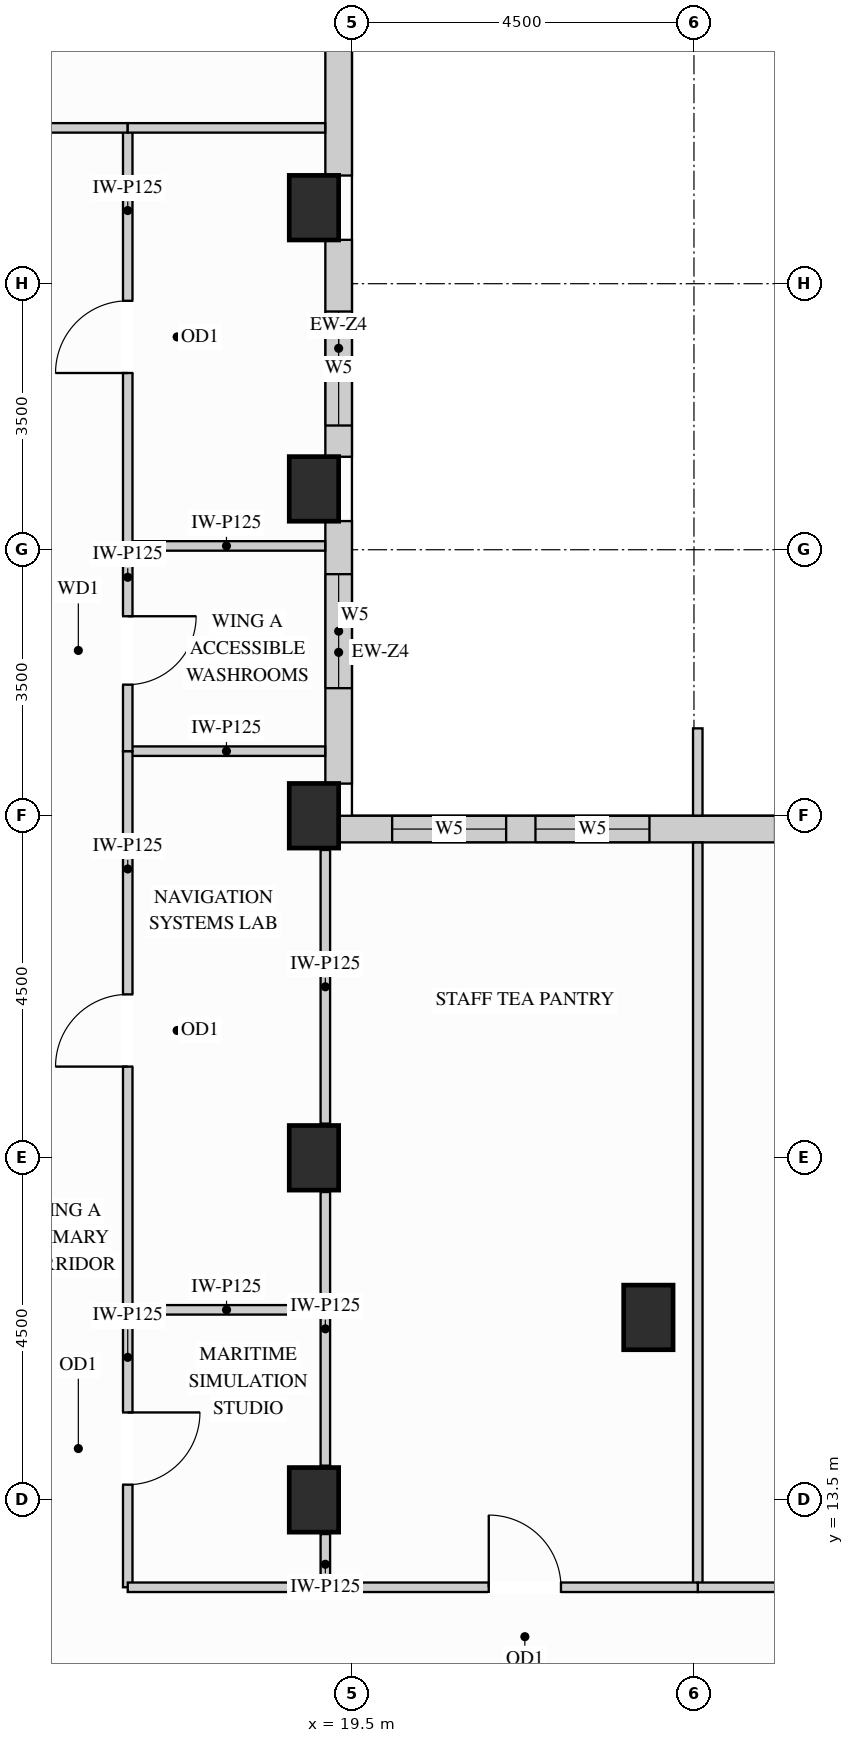
"""IFC4 building model, lengths in metres.
Left out: names, types, materials, properties, quantities, classifications, styles, units other than length and angle.
Written with IfcOpenShell. Run it as: python <this file> out.ifc"""

import sys

from ifc_helpers import new_model, si_unit, direction, frame, frame_2d, origin, origin_2d, place, context, subcontext, project, spatial, rectangle, extrude, source, transform, mapped, element, fill, save


model = new_model("IFC4")
c1 = context("Model", 3, precision=1e-05, world=origin(), true_north=direction((0.0, 1.0)))
c2 = subcontext(c1, "Body", "Model", "MODEL_VIEW")
j1 = project(units=[si_unit("LENGTHUNIT", "METRE"), si_unit("PLANEANGLEUNIT", "RADIAN")], contexts=[c1])
p1 = place(None, origin())
s1 = spatial("IfcSite", under=j1, at=p1, CompositionType="ELEMENT")
p2 = place(p1, origin())
s2 = spatial("IfcBuilding", under=s1, at=p2, CompositionType="ELEMENT")
p3 = place(p2, frame((0.0, 0.0, 255.6)))
s3 = spatial("IfcBuildingStorey", under=s2, at=p3, CompositionType="ELEMENT", Elevation=255.6)
m1 = source(origin(), c2, "Body", "SweptSolid", [
    extrude(rectangle(XDim=0.65, YDim=0.85, at=origin_2d()), origin(), (0.0, 0.0, 1.0), 3.4),
])
for number, where, z_axis, x_axis in (
    (1, (19.0, 13.5, 0.0), (0.0, 0.0, 1.0), (1.0, 0.0, 0.0)),
    (2, (19.0, 18.0, 0.0), (0.0, 0.0, 1.0), (1.0, 0.0, 0.0)),
    (3, (19.0, 22.5, 0.0), (0.0, 0.0, 1.0), (1.0, 0.0, 0.0)),
    (4, (19.0, 26.8, 0.0), (0.0, 0.0, 1.0), (1.0, 0.0, 0.0)),
    (5, (19.0, 30.5, 0.0), (0.0, 0.0, 1.0), (1.0, 0.0, 0.0)),
    (6, (23.4, 15.9, 0.0), (0.0, 0.0, 1.0), (1.0, 0.0, 0.0)),
):
    element("IfcColumn", number, at=place(p3, frame(where, z_axis=z_axis, x_axis=x_axis)), inside=s3, PredefinedType="COLUMN", context=c2, shape_type="MappedRepresentation", body=[
        mapped(m1, transform((0.0, 0.0, 0.0), x_axis=(1.0, 0.0, 0.0), y_axis=(0.0, 1.0, 0.0), z_axis=(0.0, 0.0, 1.0))),
    ])
p4 = place(p3, frame((34.4, 22.325, 0.0), z_axis=(0.0, 0.0, 1.0), x_axis=(-1.0, 0.0, 0.0)))
e7 = element("IfcWall", 7, at=p4, inside=s3, PredefinedType="SOLIDWALL", context=c2, shape_type="SweptSolid", body=[
    extrude(rectangle(XDim=15.077, YDim=0.35, at=frame_2d((7.539, 0.0))), origin(), (0.0, 0.0, 1.0), 3.385),
])
p5 = place(p4, frame((0.647, 0.0, 0.78)))
e8 = element("IfcOpeningElement", 8, at=p5, cuts=e7, PredefinedType="OPENING", context=c2, shape_type="SweptSolid", body=[
    extrude(rectangle(XDim=1.5, YDim=2.0, at=frame_2d((0.75, 1.0))), frame((0.0, 0.185, 0.0), z_axis=(0.0, -1.0, 0.0), x_axis=(1.0, 0.0, 0.0)), (0.0, 0.0, 1.0), 0.37),
])
p6 = place(p4, frame((2.473, 0.0, 0.78)))
e9 = element("IfcOpeningElement", 9, at=p6, cuts=e7, PredefinedType="OPENING", context=c2, shape_type="SweptSolid", body=[
    extrude(rectangle(XDim=1.5, YDim=2.0, at=frame_2d((0.75, 1.0))), frame((0.0, 0.185, 0.0), z_axis=(0.0, -1.0, 0.0), x_axis=(1.0, 0.0, 0.0)), (0.0, 0.0, 1.0), 0.37),
])
p7 = place(p4, frame((5.567, 0.0, 0.78)))
e10 = element("IfcOpeningElement", 10, at=p7, cuts=e7, PredefinedType="OPENING", context=c2, shape_type="SweptSolid", body=[
    extrude(rectangle(XDim=1.5, YDim=2.0, at=frame_2d((0.75, 1.0))), frame((0.0, 0.185, 0.0), z_axis=(0.0, -1.0, 0.0), x_axis=(1.0, 0.0, 0.0)), (0.0, 0.0, 1.0), 0.37),
])
p8 = place(p4, frame((7.833, 0.0, 0.78)))
e11 = element("IfcOpeningElement", 11, at=p8, cuts=e7, PredefinedType="OPENING", context=c2, shape_type="SweptSolid", body=[
    extrude(rectangle(XDim=1.5, YDim=2.0, at=frame_2d((0.75, 1.0))), frame((0.0, 0.185, 0.0), z_axis=(0.0, -1.0, 0.0), x_axis=(1.0, 0.0, 0.0)), (0.0, 0.0, 1.0), 0.37),
])
p9 = place(p4, frame((10.986, 0.0, 0.78)))
e12 = element("IfcOpeningElement", 12, at=p9, cuts=e7, PredefinedType="OPENING", context=c2, shape_type="SweptSolid", body=[
    extrude(rectangle(XDim=1.5, YDim=2.0, at=frame_2d((0.75, 1.0))), frame((0.0, 0.185, 0.0), z_axis=(0.0, -1.0, 0.0), x_axis=(1.0, 0.0, 0.0)), (0.0, 0.0, 1.0), 0.37),
])
p10 = place(p4, frame((12.871, 0.0, 0.78)))
e13 = element("IfcOpeningElement", 13, at=p10, cuts=e7, PredefinedType="OPENING", context=c2, shape_type="SweptSolid", body=[
    extrude(rectangle(XDim=1.5, YDim=2.0, at=frame_2d((0.75, 1.0))), frame((0.0, 0.185, 0.0), z_axis=(0.0, -1.0, 0.0), x_axis=(1.0, 0.0, 0.0)), (0.0, 0.0, 1.0), 0.37),
])
p11 = place(p3, frame((19.325, 22.923, 0.0), z_axis=(0.0, 0.0, 1.0), x_axis=(0.0, 1.0, 0.0)))
e14 = element("IfcWall", 14, at=p11, inside=s3, PredefinedType="SOLIDWALL", context=c2, shape_type="SweptSolid", body=[
    extrude(rectangle(XDim=3.454, YDim=0.35, at=frame_2d((1.727, 0.0))), origin(), (0.0, 0.0, 1.0), 2.619),
])
p12 = place(p11, frame((1.256, 0.0, 0.78)))
e15 = element("IfcOpeningElement", 15, at=p12, cuts=e14, PredefinedType="OPENING", context=c2, shape_type="SweptSolid", body=[
    extrude(rectangle(XDim=1.5, YDim=1.659, at=frame_2d((0.75, 0.83))), frame((0.0, 0.185, 0.0), z_axis=(0.0, -1.0, 0.0), x_axis=(1.0, 0.0, 0.0)), (0.0, 0.0, 1.0), 0.37),
])
p13 = place(p3, frame((19.325, 27.223, 0.0), z_axis=(0.0, 0.0, 1.0), x_axis=(0.0, 1.0, 0.0)))
e16 = element("IfcWall", 16, at=p13, inside=s3, PredefinedType="SOLIDWALL", context=c2, shape_type="SweptSolid", body=[
    extrude(rectangle(XDim=2.854, YDim=0.35, at=frame_2d((1.427, 0.0))), origin(), (0.0, 0.0, 1.0), 2.619),
])
p14 = place(p13, frame((0.411, 0.0, 0.78)))
e17 = element("IfcOpeningElement", 17, at=p14, cuts=e16, PredefinedType="OPENING", context=c2, shape_type="SweptSolid", body=[
    extrude(rectangle(XDim=1.5, YDim=1.659, at=frame_2d((0.75, 0.83))), frame((0.0, 0.185, 0.0), z_axis=(0.0, -1.0, 0.0), x_axis=(1.0, 0.0, 0.0)), (0.0, 0.0, 1.0), 0.37),
])
m2 = source(origin(), c2, "Body", "SweptSolid", [
    extrude(rectangle(XDim=3.654, YDim=0.35, at=frame_2d((1.827, 0.0))), origin(), (0.0, 0.0, 1.0), 2.619),
])
p15 = place(p3, frame((19.325, 30.923, 0.0), z_axis=(0.0, 0.0, 1.0), x_axis=(0.0, 1.0, 0.0)))
e18 = element("IfcWall", 18, at=p15, inside=s3, PredefinedType="SOLIDWALL", context=c2, shape_type="MappedRepresentation", body=[
    mapped(m2, transform((0.0, 0.0, 0.0), x_axis=(1.0, 0.0, 0.0), y_axis=(0.0, 1.0, 0.0), z_axis=(0.0, 0.0, 1.0))),
])
m3 = source(origin(), c2, "Body", "SweptSolid", [
    extrude(rectangle(XDim=2.6, YDim=0.125, at=frame_2d((1.3, 0.0))), origin(), (0.0, 0.0, 1.0), 3.385),
])
p16 = place(p3, frame((16.55, 16.0, 0.0), z_axis=(0.0, 0.0, 1.0), x_axis=(1.0, 0.0, 0.0)))
e19 = element("IfcWall", 19, at=p16, inside=s3, PredefinedType="PARTITIONING", context=c2, shape_type="MappedRepresentation", body=[
    mapped(m3, transform((0.0, 0.0, 0.0), x_axis=(1.0, 0.0, 0.0), y_axis=(0.0, 1.0, 0.0), z_axis=(0.0, 0.0, 1.0))),
])
m4 = source(origin(), c2, "Body", "SweptSolid", [
    extrude(rectangle(XDim=2.598, YDim=0.125, at=frame_2d((1.299, 0.0))), origin(), (0.0, 0.0, 1.0), 3.385),
])
for number, where, z_axis, x_axis in (
    (20, (16.55, 23.35, 0.0), (0.0, 0.0, 1.0), (1.0, 0.0, 0.0)),
    (21, (16.55, 26.05, 0.0), (0.0, 0.0, 1.0), (1.0, 0.0, 0.0)),
):
    element("IfcWall", number, at=place(p3, frame(where, z_axis=z_axis, x_axis=x_axis)), inside=s3, PredefinedType="PARTITIONING", context=c2, shape_type="MappedRepresentation", body=[
        mapped(m4, transform((0.0, 0.0, 0.0), x_axis=(1.0, 0.0, 0.0), y_axis=(0.0, 1.0, 0.0), z_axis=(0.0, 0.0, 1.0))),
    ])
m5 = source(origin(), c2, "Body", "SweptSolid", [
    extrude(rectangle(XDim=0.7, YDim=0.125, at=frame_2d((0.35, 0.0))), origin(), (0.0, 0.0, 1.0), 2.773),
])
p17 = place(p3, frame((19.15, 12.35, 0.0), z_axis=(0.0, 0.0, 1.0), x_axis=(0.0, 1.0, 0.0)))
e22 = element("IfcWall", 22, at=p17, inside=s3, PredefinedType="PARTITIONING", context=c2, shape_type="MappedRepresentation", body=[
    mapped(m5, transform((0.0, 0.0, 0.0), x_axis=(1.0, 0.0, 0.0), y_axis=(0.0, 1.0, 0.0), z_axis=(0.0, 0.0, 1.0))),
])
m6 = source(origin(), c2, "Body", "SweptSolid", [
    extrude(rectangle(XDim=3.6, YDim=0.125, at=frame_2d((1.8, 0.0))), origin(), (0.0, 0.0, 1.0), 2.773),
])
for number, where, z_axis, x_axis in (
    (23, (19.15, 13.95, 0.0), (0.0, 0.0, 1.0), (0.0, 1.0, 0.0)),
    (24, (19.15, 18.45, 0.0), (0.0, 0.0, 1.0), (0.0, 1.0, 0.0)),
):
    element("IfcWall", number, at=place(p3, frame(where, z_axis=z_axis, x_axis=x_axis)), inside=s3, PredefinedType="PARTITIONING", context=c2, shape_type="MappedRepresentation", body=[
        mapped(m6, transform((0.0, 0.0, 0.0), x_axis=(1.0, 0.0, 0.0), y_axis=(0.0, 1.0, 0.0), z_axis=(0.0, 0.0, 1.0))),
    ])
p18 = place(p3, frame((16.55, 12.35, 0.0), z_axis=(0.0, 0.0, 1.0), x_axis=(0.0, 1.0, 0.0)))
e25 = element("IfcWall", 25, at=p18, inside=s3, PredefinedType="PARTITIONING", context=c2, shape_type="SweptSolid", body=[
    extrude(rectangle(XDim=3.65, YDim=0.125, at=frame_2d((1.825, 0.0))), origin(), (0.0, 0.0, 1.0), 3.385),
])
p19 = place(p18, frame((1.35, 0.0, 0.0)))
e26 = element("IfcOpeningElement", 26, at=p19, cuts=e25, PredefinedType="OPENING", context=c2, shape_type="SweptSolid", body=[
    extrude(rectangle(XDim=0.95, YDim=2.15, at=frame_2d((0.475, 1.075))), frame((0.0, 0.073, 0.0), z_axis=(0.0, -1.0, 0.0), x_axis=(1.0, 0.0, 0.0)), (0.0, 0.0, 1.0), 0.145),
])
p20 = place(p3, frame((16.55, 16.0, 0.0), z_axis=(0.0, 0.0, 1.0), x_axis=(0.0, 1.0, 0.0)))
e27 = element("IfcWall", 27, at=p20, inside=s3, PredefinedType="PARTITIONING", context=c2, shape_type="SweptSolid", body=[
    extrude(rectangle(XDim=7.35, YDim=0.125, at=frame_2d((3.675, 0.0))), origin(), (0.0, 0.0, 1.0), 3.385),
])
p21 = place(p20, frame((3.2, 0.0, 0.0)))
e28 = element("IfcOpeningElement", 28, at=p21, cuts=e27, PredefinedType="OPENING", context=c2, shape_type="SweptSolid", body=[
    extrude(rectangle(XDim=0.95, YDim=2.15, at=frame_2d((0.475, 1.075))), frame((0.0, 0.073, 0.0), z_axis=(0.0, -1.0, 0.0), x_axis=(1.0, 0.0, 0.0)), (0.0, 0.0, 1.0), 0.145),
])
p22 = place(p3, frame((16.55, 26.05, 0.0), z_axis=(0.0, 0.0, 1.0), x_axis=(0.0, 1.0, 0.0)))
e29 = element("IfcWall", 29, at=p22, inside=s3, PredefinedType="PARTITIONING", context=c2, shape_type="SweptSolid", body=[
    extrude(rectangle(XDim=5.5, YDim=0.125, at=frame_2d((2.75, 0.0))), origin(), (0.0, 0.0, 1.0), 3.385),
])
p23 = place(p22, frame((2.275, 0.0, 0.0)))
e30 = element("IfcOpeningElement", 30, at=p23, cuts=e29, PredefinedType="OPENING", context=c2, shape_type="SweptSolid", body=[
    extrude(rectangle(XDim=0.95, YDim=2.15, at=frame_2d((0.475, 1.075))), frame((0.0, 0.073, 0.0), z_axis=(0.0, -1.0, 0.0), x_axis=(1.0, 0.0, 0.0)), (0.0, 0.0, 1.0), 0.145),
])
p24 = place(p3, frame((16.55, 23.35, 0.0), z_axis=(0.0, 0.0, 1.0), x_axis=(0.0, 1.0, 0.0)))
e31 = element("IfcWall", 31, at=p24, inside=s3, PredefinedType="PARTITIONING", context=c2, shape_type="SweptSolid", body=[
    extrude(rectangle(XDim=2.7, YDim=0.125, at=frame_2d((1.35, 0.0))), origin(), (0.0, 0.0, 1.0), 3.385),
])
p25 = place(p24, frame((0.875, 0.0, 0.0)))
e32 = element("IfcOpeningElement", 32, at=p25, cuts=e31, PredefinedType="OPENING", context=c2, shape_type="SweptSolid", body=[
    extrude(rectangle(XDim=0.9, YDim=2.15, at=frame_2d((0.45, 1.075))), frame((0.0, 0.073, 0.0), z_axis=(0.0, -1.0, 0.0), x_axis=(1.0, 0.0, 0.0)), (0.0, 0.0, 1.0), 0.145),
])
p26 = place(p3, frame((2.45, 31.55, 0.0), z_axis=(0.0, 0.0, 1.0), x_axis=(1.0, 0.0, 0.0)))
e33 = element("IfcWall", 33, at=p26, inside=s3, PredefinedType="PARTITIONING", context=c2, shape_type="SweptSolid", body=[
    extrude(rectangle(XDim=14.1, YDim=0.125, at=frame_2d((7.05, 0.0))), origin(), (0.0, 0.0, 1.0), 3.385),
])
p27 = place(p26, frame((6.575, 0.0, 0.0)))
e34 = element("IfcOpeningElement", 34, at=p27, cuts=e33, PredefinedType="OPENING", context=c2, shape_type="SweptSolid", body=[
    extrude(rectangle(XDim=0.95, YDim=2.15, at=frame_2d((0.475, 1.075))), frame((0.0, 0.073, 0.0), z_axis=(0.0, -1.0, 0.0), x_axis=(1.0, 0.0, 0.0)), (0.0, 0.0, 1.0), 0.145),
])
p28 = place(p3, frame((16.55, 31.55, 0.0), z_axis=(0.0, 0.0, 1.0), x_axis=(1.0, 0.0, 0.0)))
e35 = element("IfcWall", 35, at=p28, inside=s3, PredefinedType="PARTITIONING", context=c2, shape_type="MappedRepresentation", body=[
    mapped(m4, transform((0.0, 0.0, 0.0), x_axis=(1.0, 0.0, 0.0), y_axis=(0.0, 1.0, 0.0), z_axis=(0.0, 0.0, 1.0))),
])
m7 = source(origin(), c2, "Body", "SweptSolid", [
    extrude(rectangle(XDim=9.798, YDim=0.125, at=frame_2d((4.899, 0.0))), origin(), (0.0, 0.0, 1.0), 3.385),
])
p29 = place(p3, frame((24.05, 12.35, 0.0), z_axis=(0.0, 0.0, 1.0), x_axis=(0.0, 1.0, 0.0)))
e36 = element("IfcWall", 36, at=p29, inside=s3, PredefinedType="PARTITIONING", context=c2, shape_type="MappedRepresentation", body=[
    mapped(m7, transform((0.0, 0.0, 0.0), x_axis=(1.0, 0.0, 0.0), y_axis=(0.0, 1.0, 0.0), z_axis=(0.0, 0.0, 1.0))),
])
m8 = source(origin(), c2, "Body", "SweptSolid", [
    extrude(rectangle(XDim=1.148, YDim=0.125, at=frame_2d((0.574, 0.0))), origin(), (0.0, 0.0, 1.0), 3.385),
])
p30 = place(p3, frame((24.05, 22.502, 0.0), z_axis=(0.0, 0.0, 1.0), x_axis=(0.0, 1.0, 0.0)))
e37 = element("IfcWall", 37, at=p30, inside=s3, PredefinedType="PARTITIONING", context=c2, shape_type="MappedRepresentation", body=[
    mapped(m8, transform((0.0, 0.0, 0.0), x_axis=(1.0, 0.0, 0.0), y_axis=(0.0, 1.0, 0.0), z_axis=(0.0, 0.0, 1.0))),
])
p31 = place(p3, frame((24.05, 12.35, 0.0), z_axis=(0.0, 0.0, 1.0), x_axis=(1.0, 0.0, 0.0)))
e38 = element("IfcWall", 38, at=p31, inside=s3, PredefinedType="PARTITIONING", context=c2, shape_type="SweptSolid", body=[
    extrude(rectangle(XDim=5.8, YDim=0.125, at=frame_2d((2.9, 0.0))), origin(), (0.0, 0.0, 1.0), 3.385),
])
p32 = place(p31, frame((2.425, 0.0, 0.0)))
e39 = element("IfcOpeningElement", 39, at=p32, cuts=e38, PredefinedType="OPENING", context=c2, shape_type="SweptSolid", body=[
    extrude(rectangle(XDim=0.95, YDim=2.15, at=frame_2d((0.475, 1.075))), frame((0.0, 0.073, 0.0), z_axis=(0.0, -1.0, 0.0), x_axis=(1.0, 0.0, 0.0)), (0.0, 0.0, 1.0), 0.145),
])
m9 = source(origin(), c2, "Body", "SweptSolid", [
    extrude(rectangle(XDim=2.95, YDim=0.125, at=frame_2d((1.475, 0.0))), origin(), (0.0, 0.0, 1.0), 3.385),
])
p33 = place(p3, frame((16.55, 12.35, 0.0), z_axis=(0.0, 0.0, 1.0), x_axis=(1.0, 0.0, 0.0)))
e40 = element("IfcWall", 40, at=p33, inside=s3, PredefinedType="PARTITIONING", context=c2, shape_type="MappedRepresentation", body=[
    mapped(m9, transform((0.0, 0.0, 0.0), x_axis=(1.0, 0.0, 0.0), y_axis=(0.0, 1.0, 0.0), z_axis=(0.0, 0.0, 1.0))),
])
p34 = place(p3, frame((19.5, 12.35, 0.0), z_axis=(0.0, 0.0, 1.0), x_axis=(1.0, 0.0, 0.0)))
e41 = element("IfcWall", 41, at=p34, inside=s3, PredefinedType="PARTITIONING", context=c2, shape_type="SweptSolid", body=[
    extrude(rectangle(XDim=4.55, YDim=0.125, at=frame_2d((2.275, 0.0))), origin(), (0.0, 0.0, 1.0), 3.385),
])
p35 = place(p34, frame((1.8, 0.0, 0.0)))
e42 = element("IfcOpeningElement", 42, at=p35, cuts=e41, PredefinedType="OPENING", context=c2, shape_type="SweptSolid", body=[
    extrude(rectangle(XDim=0.95, YDim=2.15, at=frame_2d((0.475, 1.075))), frame((0.0, 0.073, 0.0), z_axis=(0.0, -1.0, 0.0), x_axis=(1.0, 0.0, 0.0)), (0.0, 0.0, 1.0), 0.145),
])
m10 = source(origin(), c2, "Body", "SweptSolid", [
    extrude(rectangle(XDim=0.95, YDim=2.15, at=frame_2d((0.475, 1.075))), frame((0.0, 0.025, 0.0), z_axis=(0.0, -1.0, 0.0), x_axis=(1.0, 0.0, 0.0)), (0.0, 0.0, 1.0), 0.05),
])
p36 = place(p19, origin())
e43 = element("IfcDoor", 43, at=p36, inside=s3, OperationType="SINGLE_SWING_RIGHT", PredefinedType="DOOR", context=c2, shape_type="MappedRepresentation", body=[
    mapped(m10, transform((0.0, 0.0, 0.0), x_axis=(1.0, 0.0, 0.0), y_axis=(0.0, 1.0, 0.0), z_axis=(0.0, 0.0, 1.0))),
])
fill(e26, e43)
p37 = place(p21, origin())
e44 = element("IfcDoor", 44, at=p37, inside=s3, OperationType="SINGLE_SWING_LEFT", PredefinedType="DOOR", context=c2, shape_type="MappedRepresentation", body=[
    mapped(m10, transform((0.0, 0.0, 0.0), x_axis=(1.0, 0.0, 0.0), y_axis=(0.0, 1.0, 0.0), z_axis=(0.0, 0.0, 1.0))),
])
fill(e28, e44)
p38 = place(p23, origin())
e45 = element("IfcDoor", 45, at=p38, inside=s3, OperationType="SINGLE_SWING_LEFT", PredefinedType="DOOR", context=c2, shape_type="MappedRepresentation", body=[
    mapped(m10, transform((0.0, 0.0, 0.0), x_axis=(1.0, 0.0, 0.0), y_axis=(0.0, 1.0, 0.0), z_axis=(0.0, 0.0, 1.0))),
])
fill(e30, e45)
p39 = place(p35, origin())
e46 = element("IfcDoor", 46, at=p39, inside=s3, OperationType="SINGLE_SWING_LEFT", PredefinedType="DOOR", context=c2, shape_type="MappedRepresentation", body=[
    mapped(m10, transform((0.0, 0.0, 0.0), x_axis=(1.0, 0.0, 0.0), y_axis=(0.0, 1.0, 0.0), z_axis=(0.0, 0.0, 1.0))),
])
fill(e42, e46)
m11 = source(origin(), c2, "Body", "SweptSolid", [
    extrude(rectangle(XDim=0.9, YDim=2.15, at=frame_2d((0.45, 1.075))), frame((0.0, 0.025, 0.0), z_axis=(0.0, -1.0, 0.0), x_axis=(1.0, 0.0, 0.0)), (0.0, 0.0, 1.0), 0.05),
])
p40 = place(p25, origin())
e47 = element("IfcDoor", 47, at=p40, inside=s3, OperationType="SINGLE_SWING_RIGHT", PredefinedType="DOOR", context=c2, shape_type="MappedRepresentation", body=[
    mapped(m11, transform((0.0, 0.0, 0.0), x_axis=(1.0, 0.0, 0.0), y_axis=(0.0, 1.0, 0.0), z_axis=(0.0, 0.0, 1.0))),
])
fill(e32, e47)
m12 = source(origin(), c2, "Body", "SweptSolid", [
    extrude(rectangle(XDim=1.5, YDim=2.0, at=frame_2d((0.75, 1.0))), frame((0.0, 0.03, 0.0), z_axis=(0.0, -1.0, 0.0), x_axis=(1.0, 0.0, 0.0)), (0.0, 0.0, 1.0), 0.06),
])
p41 = place(p9, origin())
e48 = element("IfcWindow", 48, at=p41, inside=s3, PartitioningType="SINGLE_PANEL", PredefinedType="WINDOW", context=c2, shape_type="MappedRepresentation", body=[
    mapped(m12, transform((0.0, 0.0, 0.0), x_axis=(1.0, 0.0, 0.0), y_axis=(0.0, 1.0, 0.0), z_axis=(0.0, 0.0, 1.0))),
])
fill(e12, e48)
p42 = place(p10, origin())
e49 = element("IfcWindow", 49, at=p42, inside=s3, PartitioningType="SINGLE_PANEL", PredefinedType="WINDOW", context=c2, shape_type="MappedRepresentation", body=[
    mapped(m12, transform((0.0, 0.0, 0.0), x_axis=(1.0, 0.0, 0.0), y_axis=(0.0, 1.0, 0.0), z_axis=(0.0, 0.0, 1.0))),
])
fill(e13, e49)
m13 = source(origin(), c2, "Body", "SweptSolid", [
    extrude(rectangle(XDim=1.5, YDim=1.659, at=frame_2d((0.75, 0.83))), frame((0.0, 0.03, 0.0), z_axis=(0.0, -1.0, 0.0), x_axis=(1.0, 0.0, 0.0)), (0.0, 0.0, 1.0), 0.06),
])
p43 = place(p12, origin())
e50 = element("IfcWindow", 50, at=p43, inside=s3, PartitioningType="SINGLE_PANEL", PredefinedType="WINDOW", context=c2, shape_type="MappedRepresentation", body=[
    mapped(m13, transform((0.0, 0.0, 0.0), x_axis=(1.0, 0.0, 0.0), y_axis=(0.0, 1.0, 0.0), z_axis=(0.0, 0.0, 1.0))),
])
fill(e15, e50)
p44 = place(p14, origin())
e51 = element("IfcWindow", 51, at=p44, inside=s3, PartitioningType="SINGLE_PANEL", PredefinedType="WINDOW", context=c2, shape_type="MappedRepresentation", body=[
    mapped(m13, transform((0.0, 0.0, 0.0), x_axis=(1.0, 0.0, 0.0), y_axis=(0.0, 1.0, 0.0), z_axis=(0.0, 0.0, 1.0))),
])
fill(e17, e51)
save(model, sys.argv[1])
